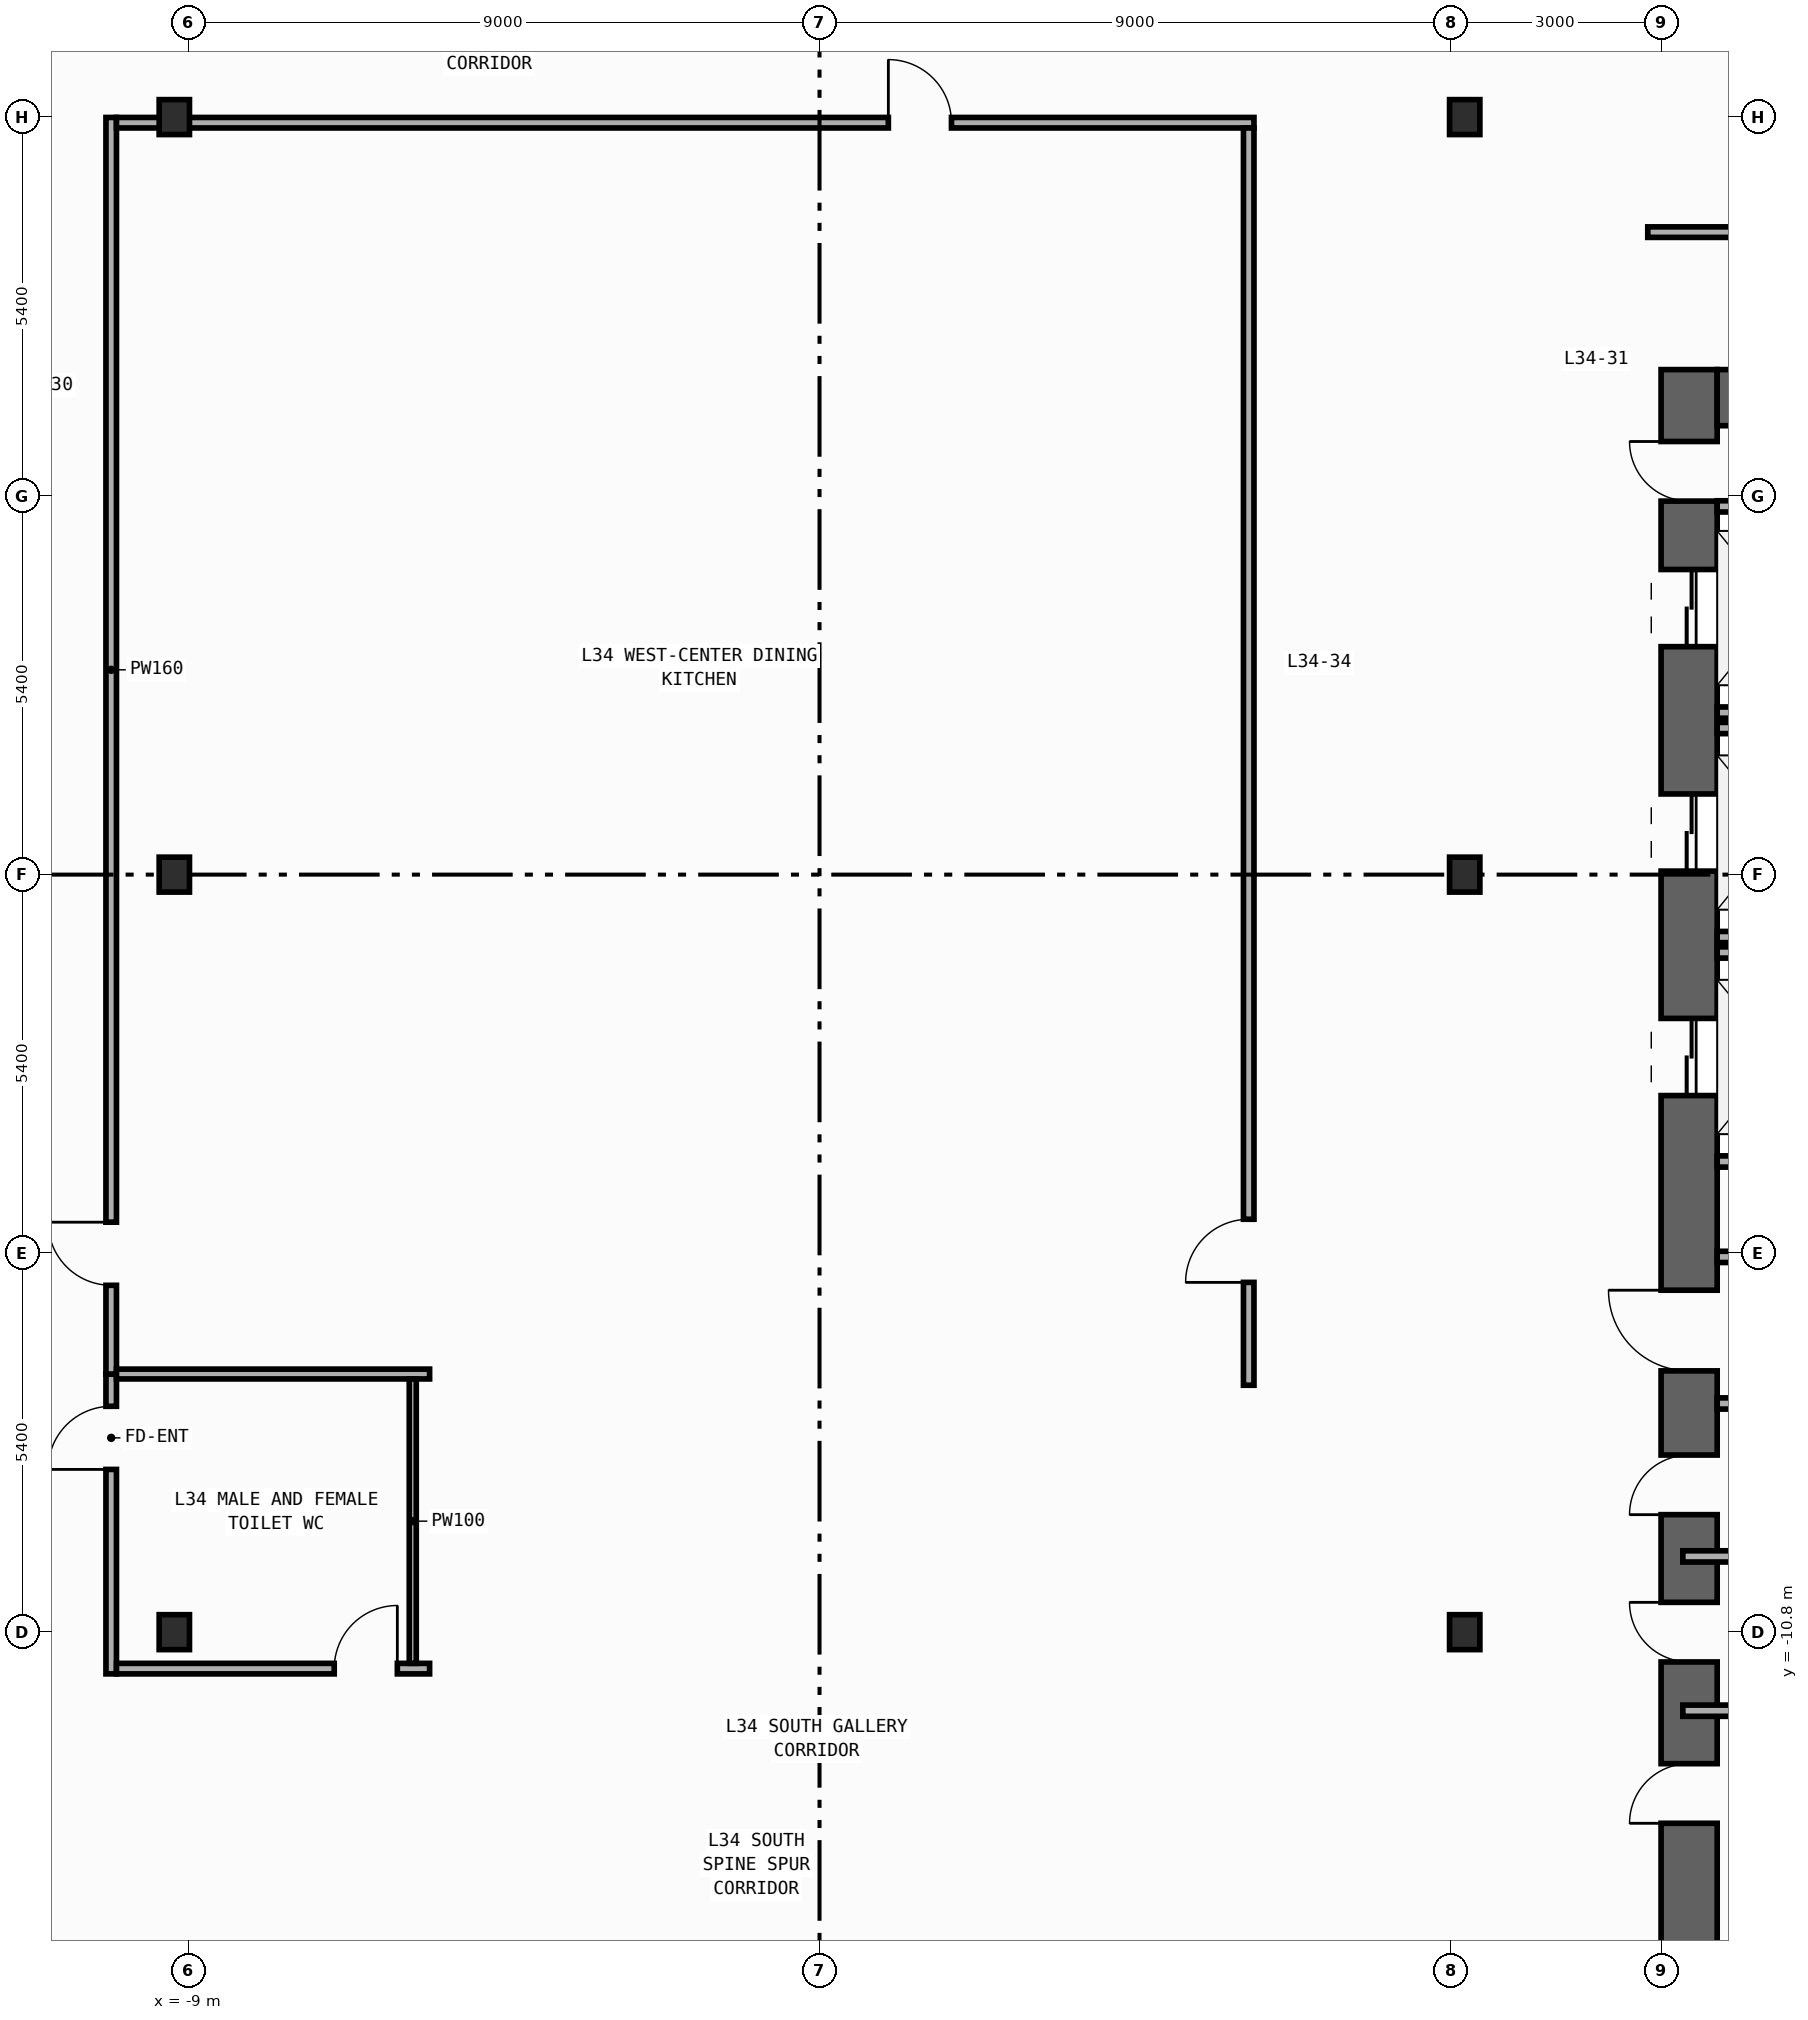
"""IFC4 building model, lengths in metres.
Left out: names, types, materials, properties, quantities, classifications, styles, units other than length and angle.
Written with IfcOpenShell. Run it as: python <this file> out.ifc"""

import sys

from ifc_helpers import new_model, si_unit, direction, frame, frame_2d, origin, origin_2d, place, context, subcontext, project, spatial, rectangle, i_section, extrude, element, fill, save


model = new_model("IFC4")
c1 = context("Model", 3, precision=1e-05, world=origin(), true_north=direction((0.0, 1.0)))
c2 = subcontext(c1, "Body", "Model", "MODEL_VIEW")
j1 = project(units=[si_unit("LENGTHUNIT", "METRE"), si_unit("PLANEANGLEUNIT", "RADIAN")], contexts=[c1])
p1 = place(None, origin())
s1 = spatial("IfcSite", under=j1, at=p1, CompositionType="ELEMENT")
p2 = place(p1, origin())
s2 = spatial("IfcBuilding", under=s1, at=p2, CompositionType="ELEMENT")
p3 = place(p2, frame((0.0, 0.0, 147.8)))
s3 = spatial("IfcBuildingStorey", under=s2, at=p3, CompositionType="ELEMENT", Elevation=147.8)
p4 = place(p3, frame((12.4, -19.8, 0.0), z_axis=(0.0, 0.0, 1.0), x_axis=(0.0, 1.0, 0.0)))
e1 = element("IfcWall", 1, at=p4, inside=s3, PredefinedType="SHEAR", context=c2, shape_type="SweptSolid", body=[
    extrude(rectangle(XDim=27.0, YDim=0.8, at=frame_2d((13.5, 0.0))), origin(), (0.0, 0.0, 1.0), 3.85),
])
p5 = place(p4, frame((23.05, 0.0, 0.0)))
e2 = element("IfcOpeningElement", 2, at=p5, cuts=e1, PredefinedType="OPENING", context=c2, shape_type="SweptSolid", body=[
    extrude(rectangle(XDim=1.1, YDim=2.2, at=frame_2d((0.55, 1.1))), frame((0.0, 0.41, 0.0), z_axis=(0.0, -1.0, 0.0), x_axis=(1.0, 0.0, 0.0)), (0.0, 0.0, 1.0), 0.82),
])
p6 = place(p4, frame((19.85, 0.0, 0.0)))
e3 = element("IfcOpeningElement", 3, at=p6, cuts=e1, PredefinedType="OPENING", context=c2, shape_type="SweptSolid", body=[
    extrude(rectangle(XDim=1.1, YDim=2.2, at=frame_2d((0.55, 1.1))), frame((0.0, 0.41, 0.0), z_axis=(0.0, -1.0, 0.0), x_axis=(1.0, 0.0, 0.0)), (0.0, 0.0, 1.0), 0.82),
])
p7 = place(p4, frame((16.65, 0.0, 0.0)))
e4 = element("IfcOpeningElement", 4, at=p7, cuts=e1, PredefinedType="OPENING", context=c2, shape_type="SweptSolid", body=[
    extrude(rectangle(XDim=1.1, YDim=2.2, at=frame_2d((0.55, 1.1))), frame((0.0, 0.41, 0.0), z_axis=(0.0, -1.0, 0.0), x_axis=(1.0, 0.0, 0.0)), (0.0, 0.0, 1.0), 0.82),
])
p8 = place(p4, frame((6.275, 0.0, 0.0)))
e5 = element("IfcOpeningElement", 5, at=p8, cuts=e1, PredefinedType="OPENING", context=c2, shape_type="SweptSolid", body=[
    extrude(rectangle(XDim=0.85, YDim=2.1, at=frame_2d((0.425, 1.05))), frame((0.0, 0.41, 0.0), z_axis=(0.0, -1.0, 0.0), x_axis=(1.0, 0.0, 0.0)), (0.0, 0.0, 1.0), 0.82),
])
p9 = place(p4, frame((8.575, 0.0, 0.0)))
e6 = element("IfcOpeningElement", 6, at=p9, cuts=e1, PredefinedType="OPENING", context=c2, shape_type="SweptSolid", body=[
    extrude(rectangle(XDim=0.85, YDim=2.1, at=frame_2d((0.425, 1.05))), frame((0.0, 0.41, 0.0), z_axis=(0.0, -1.0, 0.0), x_axis=(1.0, 0.0, 0.0)), (0.0, 0.0, 1.0), 0.82),
])
p10 = place(p4, frame((10.675, 0.0, 0.0)))
e7 = element("IfcOpeningElement", 7, at=p10, cuts=e1, PredefinedType="OPENING", context=c2, shape_type="SweptSolid", body=[
    extrude(rectangle(XDim=0.85, YDim=2.1, at=frame_2d((0.425, 1.05))), frame((0.0, 0.41, 0.0), z_axis=(0.0, -1.0, 0.0), x_axis=(1.0, 0.0, 0.0)), (0.0, 0.0, 1.0), 0.82),
])
p11 = place(p4, frame((12.725, 0.0, 0.0)))
e8 = element("IfcOpeningElement", 8, at=p11, cuts=e1, PredefinedType="OPENING", context=c2, shape_type="SweptSolid", body=[
    extrude(rectangle(XDim=1.15, YDim=2.2, at=frame_2d((0.575, 1.1))), frame((0.0, 0.41, 0.0), z_axis=(0.0, -1.0, 0.0), x_axis=(1.0, 0.0, 0.0)), (0.0, 0.0, 1.0), 0.82),
])
p12 = place(p4, frame((25.125, 0.0, 0.0)))
e9 = element("IfcOpeningElement", 9, at=p12, cuts=e1, PredefinedType="OPENING", context=c2, shape_type="SweptSolid", body=[
    extrude(rectangle(XDim=0.85, YDim=2.1, at=frame_2d((0.425, 1.05))), frame((0.0, 0.41, 0.0), z_axis=(0.0, -1.0, 0.0), x_axis=(1.0, 0.0, 0.0)), (0.0, 0.0, 1.0), 0.82),
])
p13 = place(p3, frame((12.8, 6.8, 0.0), z_axis=(0.0, 0.0, 1.0), x_axis=(1.0, 0.0, 0.0)))
e10 = element("IfcWall", 10, at=p13, inside=s3, PredefinedType="SHEAR", context=c2, shape_type="SweptSolid", body=[
    extrude(rectangle(XDim=6.8, YDim=0.8, at=frame_2d((3.4, 0.0))), origin(), (0.0, 0.0, 1.0), 3.85),
])
for number, where, z_axis, x_axis in (
    (11, (-9.2, -10.8, 0.0), (0.0, 0.0, 1.0), (1.0, 0.0, 0.0)),
    (12, (-9.2, 0.0, 0.0), (0.0, 0.0, 1.0), (1.0, 0.0, 0.0)),
    (13, (-9.2, 10.8, 0.0), (0.0, 0.0, 1.0), (1.0, 0.0, 0.0)),
    (14, (9.2, -10.8, 0.0), (0.0, 0.0, 1.0), (1.0, 0.0, 0.0)),
    (15, (9.2, 0.0, 0.0), (0.0, 0.0, 1.0), (1.0, 0.0, 0.0)),
    (16, (9.2, 10.8, 0.0), (0.0, 0.0, 1.0), (1.0, 0.0, 0.0)),
):
    element("IfcColumn", number, at=place(p3, frame(where, z_axis=z_axis, x_axis=x_axis)), inside=s3, PredefinedType="COLUMN", context=c2, shape_type="SweptSolid", body=[
        extrude(i_section(OverallWidth=0.432, OverallDepth=0.498, WebThickness=0.045, FlangeThickness=0.07, FilletRadius=0.022, at=origin_2d()), origin(), (0.0, 0.0, 1.0), 4.2),
    ])
for number, where, z_axis, x_axis in (
    (17, (12.8, 2.31, 0.0), (0.0, 0.0, 1.0), (1.0, 0.0, 0.0)),
    (18, (12.8, -0.89, 0.0), (0.0, 0.0, 1.0), (1.0, 0.0, 0.0)),
    (19, (12.8, 2.09, 0.0), (0.0, 0.0, 1.0), (1.0, 0.0, 0.0)),
    (20, (12.8, -4.09, 0.0), (0.0, 0.0, 1.0), (1.0, 0.0, 0.0)),
    (21, (12.8, -1.11, 0.0), (0.0, 0.0, 1.0), (1.0, 0.0, 0.0)),
):
    element("IfcWall", number, at=place(p3, frame(where, z_axis=z_axis, x_axis=x_axis)), inside=s3, PredefinedType="STANDARD", context=c2, shape_type="SweptSolid", body=[
        extrude(rectangle(XDim=2.19, YDim=0.16, at=frame_2d((1.095, 0.0))), origin(), (0.0, 0.0, 1.0), 3.85),
    ])
for number, where, z_axis, x_axis in (
    (22, (12.8, -5.45, 0.0), (0.0, 0.0, 1.0), (1.0, 0.0, 0.0)),
    (23, (12.8, -7.54, 0.0), (0.0, 0.0, 1.0), (1.0, 0.0, 0.0)),
    (24, (12.8, 5.25, 0.0), (0.0, 0.0, 1.0), (1.0, 0.0, 0.0)),
):
    element("IfcWall", number, at=place(p3, frame(where, z_axis=z_axis, x_axis=x_axis)), inside=s3, PredefinedType="STANDARD", context=c2, shape_type="SweptSolid", body=[
        extrude(rectangle(XDim=2.6, YDim=0.16, at=frame_2d((1.3, 0.0))), origin(), (0.0, 0.0, 1.0), 3.85),
    ])
for number, where, z_axis, x_axis in (
    (25, (12.31, -11.92, 0.0), (0.0, 0.0, 1.0), (1.0, 0.0, 0.0)),
    (26, (12.31, -9.72, 0.0), (0.0, 0.0, 1.0), (1.0, 0.0, 0.0)),
):
    element("IfcWall", number, at=place(p3, frame(where, z_axis=z_axis, x_axis=x_axis)), inside=s3, PredefinedType="PARTITIONING", context=c2, shape_type="SweptSolid", body=[
        extrude(rectangle(XDim=3.065, YDim=0.16, at=frame_2d((1.532, 0.0))), origin(), (0.0, 0.0, 1.0), 3.85),
    ])
p14 = place(p3, frame((-10.1, -11.395, 0.0), z_axis=(0.0, 0.0, 1.0), x_axis=(0.0, 1.0, 0.0)))
e27 = element("IfcWall", 27, at=p14, inside=s3, PredefinedType="PARTITIONING", context=c2, shape_type="SweptSolid", body=[
    extrude(rectangle(XDim=4.275, YDim=0.15, at=frame_2d((2.137, 0.0))), origin(), (0.0, 0.0, 1.0), 3.85),
])
p15 = place(p14, frame((2.915, 0.0, 0.0)))
e28 = element("IfcOpeningElement", 28, at=p15, cuts=e27, PredefinedType="OPENING", context=c2, shape_type="SweptSolid", body=[
    extrude(rectangle(XDim=0.9, YDim=2.15, at=frame_2d((0.45, 1.075))), frame((0.0, 0.085, 0.0), z_axis=(0.0, -1.0, 0.0), x_axis=(1.0, 0.0, 0.0)), (0.0, 0.0, 1.0), 0.17),
])
p16 = place(p3, frame((-10.1, -7.12, 0.0), z_axis=(0.0, 0.0, 1.0), x_axis=(0.0, 1.0, 0.0)))
e29 = element("IfcWall", 29, at=p16, inside=s3, PredefinedType="PARTITIONING", context=c2, shape_type="SweptSolid", body=[
    extrude(rectangle(XDim=17.915, YDim=0.15, at=frame_2d((8.958, 0.0))), origin(), (0.0, 0.0, 1.0), 3.85),
])
p17 = place(p16, frame((1.265, 0.0, 0.0)))
e30 = element("IfcOpeningElement", 30, at=p17, cuts=e29, PredefinedType="OPENING", context=c2, shape_type="SweptSolid", body=[
    extrude(rectangle(XDim=0.9, YDim=2.15, at=frame_2d((0.45, 1.075))), frame((0.0, 0.085, 0.0), z_axis=(0.0, -1.0, 0.0), x_axis=(1.0, 0.0, 0.0)), (0.0, 0.0, 1.0), 0.17),
])
p18 = place(p3, frame((-10.025, 10.72, 0.0), z_axis=(0.0, 0.0, 1.0), x_axis=(1.0, 0.0, 0.0)))
e31 = element("IfcWall", 31, at=p18, inside=s3, PredefinedType="PARTITIONING", context=c2, shape_type="SweptSolid", body=[
    extrude(rectangle(XDim=16.22, YDim=0.15, at=frame_2d((8.11, 0.0))), origin(), (0.0, 0.0, 1.0), 3.15),
])
p19 = place(p18, frame((11.007, 0.0, 0.0)))
e32 = element("IfcOpeningElement", 32, at=p19, cuts=e31, PredefinedType="OPENING", context=c2, shape_type="SweptSolid", body=[
    extrude(rectangle(XDim=0.9, YDim=2.15, at=frame_2d((0.45, 1.075))), frame((0.0, 0.085, 0.0), z_axis=(0.0, -1.0, 0.0), x_axis=(1.0, 0.0, 0.0)), (0.0, 0.0, 1.0), 0.17),
])
p20 = place(p3, frame((-10.025, -11.32, 0.0), z_axis=(0.0, 0.0, 1.0), x_axis=(1.0, 0.0, 0.0)))
e33 = element("IfcWall", 33, at=p20, inside=s3, PredefinedType="PARTITIONING", context=c2, shape_type="SweptSolid", body=[
    extrude(rectangle(XDim=4.465, YDim=0.15, at=frame_2d((2.232, 0.0))), origin(), (0.0, 0.0, 1.0), 3.85),
])
p21 = place(p20, frame((3.105, 0.0, 0.0)))
e34 = element("IfcOpeningElement", 34, at=p21, cuts=e33, PredefinedType="OPENING", context=c2, shape_type="SweptSolid", body=[
    extrude(rectangle(XDim=0.9, YDim=2.15, at=frame_2d((0.45, 1.075))), frame((0.0, 0.085, 0.0), z_axis=(0.0, -1.0, 0.0), x_axis=(1.0, 0.0, 0.0)), (0.0, 0.0, 1.0), 0.17),
])
p22 = place(p3, frame((6.12, -7.28, 0.0), z_axis=(0.0, 0.0, 1.0), x_axis=(0.0, 1.0, 0.0)))
e35 = element("IfcWall", 35, at=p22, inside=s3, PredefinedType="PARTITIONING", context=c2, shape_type="SweptSolid", body=[
    extrude(rectangle(XDim=17.925, YDim=0.15, at=frame_2d((8.962, 0.0))), origin(), (0.0, 0.0, 1.0), 3.85),
])
p23 = place(p22, frame((1.467, 0.0, 0.0)))
e36 = element("IfcOpeningElement", 36, at=p23, cuts=e35, PredefinedType="OPENING", context=c2, shape_type="SweptSolid", body=[
    extrude(rectangle(XDim=0.9, YDim=2.15, at=frame_2d((0.45, 1.075))), frame((0.0, 0.085, 0.0), z_axis=(0.0, -1.0, 0.0), x_axis=(1.0, 0.0, 0.0)), (0.0, 0.0, 1.0), 0.17),
])
p24 = place(p3, frame((11.81, 9.16, 0.0), z_axis=(0.0, 0.0, 1.0), x_axis=(1.0, 0.0, 0.0)))
e37 = element("IfcWall", 37, at=p24, inside=s3, PredefinedType="PARTITIONING", context=c2, shape_type="SweptSolid", body=[
    extrude(rectangle(XDim=8.83, YDim=0.15, at=frame_2d((4.415, 0.0))), origin(), (0.0, 0.0, 1.0), 3.85),
])
p25 = place(p24, frame((5.067, 0.0, 0.0)))
e38 = element("IfcOpeningElement", 38, at=p25, cuts=e37, PredefinedType="OPENING", context=c2, shape_type="SweptSolid", body=[
    extrude(rectangle(XDim=0.9, YDim=2.15, at=frame_2d((0.45, 1.075))), frame((0.0, 0.085, 0.0), z_axis=(0.0, -1.0, 0.0), x_axis=(1.0, 0.0, 0.0)), (0.0, 0.0, 1.0), 0.17),
])
p26 = place(p3, frame((-10.025, -7.12, 0.0), z_axis=(0.0, 0.0, 1.0), x_axis=(1.0, 0.0, 0.0)))
e39 = element("IfcWall", 39, at=p26, inside=s3, PredefinedType="PARTITIONING", context=c2, shape_type="SweptSolid", body=[
    extrude(rectangle(XDim=4.465, YDim=0.14, at=frame_2d((2.232, 0.0))), origin(), (0.0, 0.0, 1.0), 3.85),
])
p27 = place(p3, frame((-5.8, -7.19, 0.0), z_axis=(0.0, 0.0, 1.0), x_axis=(0.0, -1.0, 0.0)))
e40 = element("IfcWall", 40, at=p27, inside=s3, PredefinedType="PARTITIONING", context=c2, shape_type="SweptSolid", body=[
    extrude(rectangle(XDim=4.055, YDim=0.1, at=frame_2d((2.028, 0.0))), origin(), (0.0, 0.0, 1.0), 3.85),
])
p28 = place(p5, origin())
e41 = element("IfcDoor", 41, at=p28, inside=s3, OperationType="DOUBLE_DOOR_SLIDING", PredefinedType="DOOR", context=c2, shape_type="SweptSolid", body=[
    extrude(rectangle(XDim=1.1, YDim=2.2, at=frame_2d((0.55, 1.1))), frame((0.0, 0.025, 0.0), z_axis=(0.0, -1.0, 0.0), x_axis=(1.0, 0.0, 0.0)), (0.0, 0.0, 1.0), 0.05),
])
fill(e2, e41)
p29 = place(p6, origin())
e42 = element("IfcDoor", 42, at=p29, inside=s3, OperationType="DOUBLE_DOOR_SLIDING", PredefinedType="DOOR", context=c2, shape_type="SweptSolid", body=[
    extrude(rectangle(XDim=1.1, YDim=2.2, at=frame_2d((0.55, 1.1))), frame((0.0, 0.025, 0.0), z_axis=(0.0, -1.0, 0.0), x_axis=(1.0, 0.0, 0.0)), (0.0, 0.0, 1.0), 0.05),
])
fill(e3, e42)
p30 = place(p7, origin())
e43 = element("IfcDoor", 43, at=p30, inside=s3, OperationType="DOUBLE_DOOR_SLIDING", PredefinedType="DOOR", context=c2, shape_type="SweptSolid", body=[
    extrude(rectangle(XDim=1.1, YDim=2.2, at=frame_2d((0.55, 1.1))), frame((0.0, 0.025, 0.0), z_axis=(0.0, -1.0, 0.0), x_axis=(1.0, 0.0, 0.0)), (0.0, 0.0, 1.0), 0.05),
])
fill(e4, e43)
p31 = place(p8, origin())
e44 = element("IfcDoor", 44, at=p31, inside=s3, OperationType="SINGLE_SWING_LEFT", PredefinedType="DOOR", context=c2, shape_type="SweptSolid", body=[
    extrude(rectangle(XDim=0.85, YDim=2.1, at=frame_2d((0.425, 1.05))), frame((0.0, 0.025, 0.0), z_axis=(0.0, -1.0, 0.0), x_axis=(1.0, 0.0, 0.0)), (0.0, 0.0, 1.0), 0.05),
])
fill(e5, e44)
p32 = place(p9, origin())
e45 = element("IfcDoor", 45, at=p32, inside=s3, OperationType="SINGLE_SWING_RIGHT", PredefinedType="DOOR", context=c2, shape_type="SweptSolid", body=[
    extrude(rectangle(XDim=0.85, YDim=2.1, at=frame_2d((0.425, 1.05))), frame((0.0, 0.025, 0.0), z_axis=(0.0, -1.0, 0.0), x_axis=(1.0, 0.0, 0.0)), (0.0, 0.0, 1.0), 0.05),
])
fill(e6, e45)
p33 = place(p10, origin())
e46 = element("IfcDoor", 46, at=p33, inside=s3, OperationType="SINGLE_SWING_LEFT", PredefinedType="DOOR", context=c2, shape_type="SweptSolid", body=[
    extrude(rectangle(XDim=0.85, YDim=2.1, at=frame_2d((0.425, 1.05))), frame((0.0, 0.025, 0.0), z_axis=(0.0, -1.0, 0.0), x_axis=(1.0, 0.0, 0.0)), (0.0, 0.0, 1.0), 0.05),
])
fill(e7, e46)
p34 = place(p11, origin())
e47 = element("IfcDoor", 47, at=p34, inside=s3, OperationType="SINGLE_SWING_RIGHT", PredefinedType="DOOR", context=c2, shape_type="SweptSolid", body=[
    extrude(rectangle(XDim=1.15, YDim=2.2, at=frame_2d((0.575, 1.1))), frame((0.0, 0.025, 0.0), z_axis=(0.0, -1.0, 0.0), x_axis=(1.0, 0.0, 0.0)), (0.0, 0.0, 1.0), 0.05),
])
fill(e8, e47)
p35 = place(p12, origin())
e48 = element("IfcDoor", 48, at=p35, inside=s3, OperationType="SINGLE_SWING_RIGHT", PredefinedType="DOOR", context=c2, shape_type="SweptSolid", body=[
    extrude(rectangle(XDim=0.85, YDim=2.1, at=frame_2d((0.425, 1.05))), frame((0.0, 0.025, 0.0), z_axis=(0.0, -1.0, 0.0), x_axis=(1.0, 0.0, 0.0)), (0.0, 0.0, 1.0), 0.05),
])
fill(e9, e48)
p36 = place(p15, origin())
e49 = element("IfcDoor", 49, at=p36, inside=s3, OperationType="SINGLE_SWING_LEFT", PredefinedType="DOOR", context=c2, shape_type="SweptSolid", body=[
    extrude(rectangle(XDim=0.9, YDim=2.15, at=frame_2d((0.45, 1.075))), frame((0.0, 0.025, 0.0), z_axis=(0.0, -1.0, 0.0), x_axis=(1.0, 0.0, 0.0)), (0.0, 0.0, 1.0), 0.05),
])
fill(e28, e49)
p37 = place(p17, origin())
e50 = element("IfcDoor", 50, at=p37, inside=s3, OperationType="SINGLE_SWING_RIGHT", PredefinedType="DOOR", context=c2, shape_type="SweptSolid", body=[
    extrude(rectangle(XDim=0.9, YDim=2.15, at=frame_2d((0.45, 1.075))), frame((0.0, 0.025, 0.0), z_axis=(0.0, -1.0, 0.0), x_axis=(1.0, 0.0, 0.0)), (0.0, 0.0, 1.0), 0.05),
])
fill(e30, e50)
p38 = place(p19, origin())
e51 = element("IfcDoor", 51, at=p38, inside=s3, OperationType="SINGLE_SWING_LEFT", PredefinedType="DOOR", context=c2, shape_type="SweptSolid", body=[
    extrude(rectangle(XDim=0.9, YDim=2.15, at=frame_2d((0.45, 1.075))), frame((0.0, 0.025, 0.0), z_axis=(0.0, -1.0, 0.0), x_axis=(1.0, 0.0, 0.0)), (0.0, 0.0, 1.0), 0.05),
])
fill(e32, e51)
p39 = place(p21, origin())
e52 = element("IfcDoor", 52, at=p39, inside=s3, OperationType="SINGLE_SWING_RIGHT", PredefinedType="DOOR", context=c2, shape_type="SweptSolid", body=[
    extrude(rectangle(XDim=0.9, YDim=2.15, at=frame_2d((0.45, 1.075))), frame((0.0, 0.025, 0.0), z_axis=(0.0, -1.0, 0.0), x_axis=(1.0, 0.0, 0.0)), (0.0, 0.0, 1.0), 0.05),
])
fill(e34, e52)
p40 = place(p23, origin())
e53 = element("IfcDoor", 53, at=p40, inside=s3, OperationType="SINGLE_SWING_LEFT", PredefinedType="DOOR", context=c2, shape_type="SweptSolid", body=[
    extrude(rectangle(XDim=0.9, YDim=2.15, at=frame_2d((0.45, 1.075))), frame((0.0, 0.025, 0.0), z_axis=(0.0, -1.0, 0.0), x_axis=(1.0, 0.0, 0.0)), (0.0, 0.0, 1.0), 0.05),
])
fill(e36, e53)
save(model, sys.argv[1])
